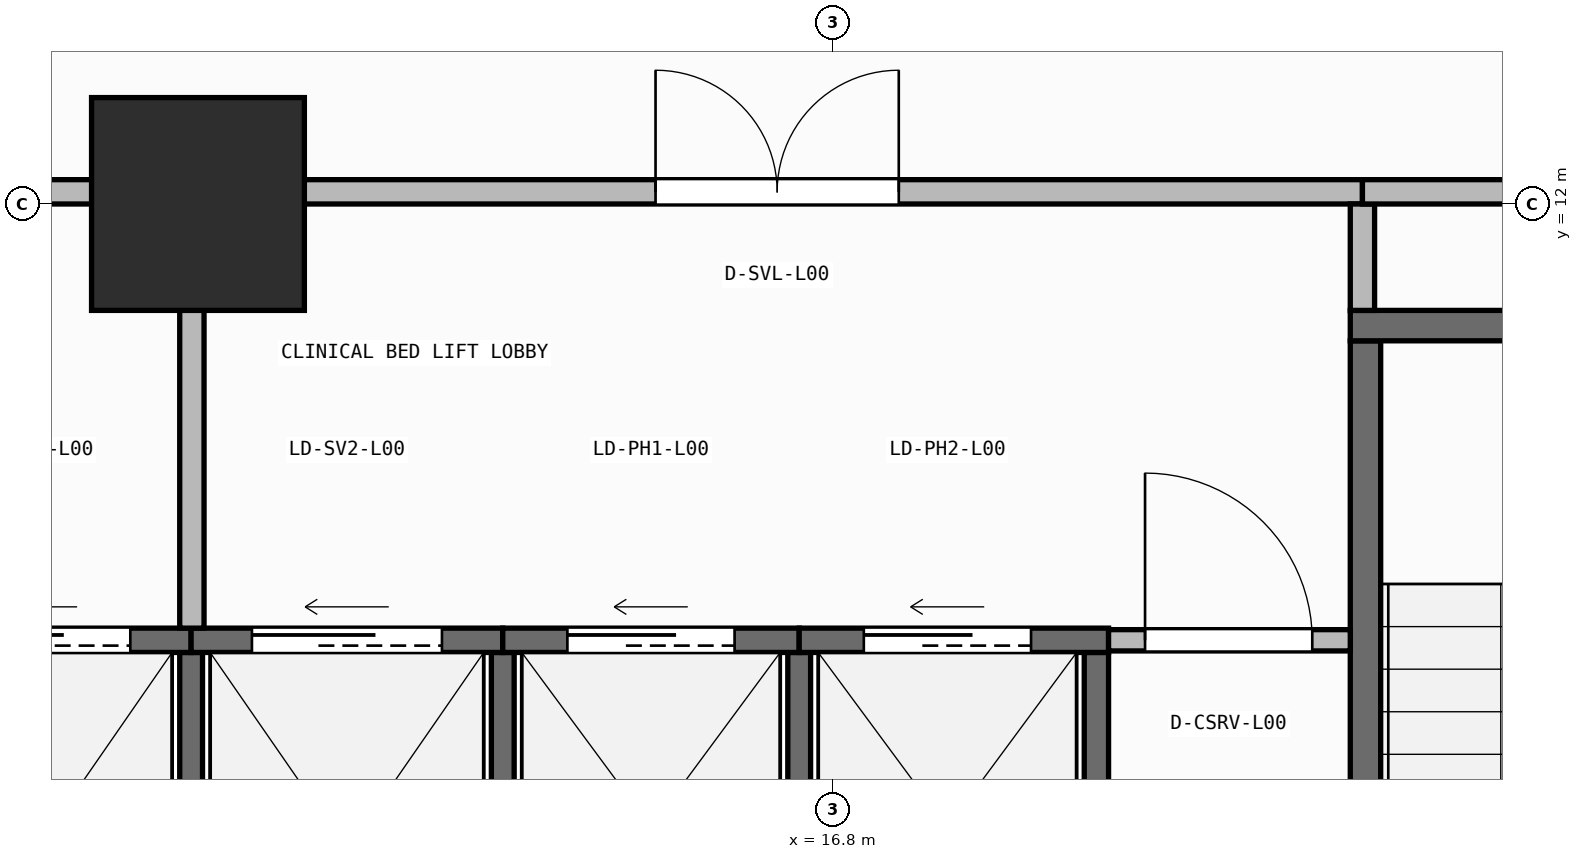
"""IFC4 building model, lengths in metres.
Left out: names, types, materials, properties, quantities, classifications, styles, units other than length and angle.
Written with IfcOpenShell. Run it as: python <this file> out.ifc"""

import sys

from ifc_helpers import new_model, si_unit, direction, frame, frame_2d, origin, origin_2d, place, context, subcontext, project, spatial, rectangle, extrude, element, fill, save


model = new_model("IFC4")
c1 = context("Model", 3, precision=1e-05, world=origin(), true_north=direction((0.0, 1.0)))
c2 = subcontext(c1, "Body", "Model", "MODEL_VIEW")
j1 = project(units=[si_unit("LENGTHUNIT", "METRE"), si_unit("PLANEANGLEUNIT", "RADIAN")], contexts=[c1])
p1 = place(None, origin())
s1 = spatial("IfcSite", under=j1, at=p1, CompositionType="ELEMENT")
p2 = place(p1, origin())
s2 = spatial("IfcBuilding", under=s1, at=p2, CompositionType="ELEMENT")
p3 = place(p2, origin())
s3 = spatial("IfcBuildingStorey", under=s2, at=p3, CompositionType="ELEMENT", Elevation=0.0)
p4 = place(p3, frame((12.62, 12.0, 0.0), z_axis=(0.0, 0.0, 1.0), x_axis=(1.0, 0.0, 0.0)))
e1 = element("IfcColumn", 1, at=p4, inside=s3, PredefinedType="COLUMN", context=c2, shape_type="SweptSolid", body=[
    extrude(rectangle(XDim=1.4, YDim=1.4, at=origin_2d()), origin(), (0.0, 0.0, 1.0), 4.5),
])
p5 = place(p3, frame((20.3, 3.5, 0.0), z_axis=(0.0, 0.0, 1.0), x_axis=(0.0, 1.0, 0.0)))
e2 = element("IfcWall", 2, at=p5, inside=s3, PredefinedType="SHEAR", context=c2, shape_type="SweptSolid", body=[
    extrude(rectangle(XDim=7.6, YDim=0.2, at=frame_2d((3.8, 0.0))), origin(), (0.0, 0.0, 1.0), 4.25),
])
p6 = place(p3, frame((20.2, 11.2, 0.0), z_axis=(0.0, 0.0, 1.0), x_axis=(1.0, 0.0, 0.0)))
e3 = element("IfcWall", 3, at=p6, inside=s3, PredefinedType="SHEAR", context=c2, shape_type="SweptSolid", body=[
    extrude(rectangle(XDim=3.7, YDim=0.2, at=frame_2d((1.85, 0.0))), origin(), (0.0, 0.0, 1.0), 4.25),
])
p7 = place(p6, frame((1.2, 0.0, 0.0)))
e4 = element("IfcOpeningElement", 4, at=p7, cuts=e3, PredefinedType="OPENING", context=c2, shape_type="SweptSolid", body=[
    extrude(rectangle(XDim=1.3, YDim=2.15, at=frame_2d((0.65, 1.075))), frame((0.0, 0.11, 0.0), z_axis=(0.0, -1.0, 0.0), x_axis=(1.0, 0.0, 0.0)), (0.0, 0.0, 1.0), 0.22),
])
p8 = place(p3, frame((18.53, 6.3, 0.0), z_axis=(0.0, 0.0, 1.0), x_axis=(0.0, 1.0, 0.0)))
e5 = element("IfcWall", 5, at=p8, inside=s3, PredefinedType="SHEAR", context=c2, shape_type="SweptSolid", body=[
    extrude(rectangle(XDim=2.75, YDim=0.16, at=frame_2d((1.375, 0.0))), origin(), (0.0, 0.0, 1.0), 4.25),
])
for number, where, z_axis, x_axis in (
    (6, (12.575, 6.3, 0.0), (0.0, 0.0, 1.0), (0.0, 1.0, 0.0)),
    (7, (14.625, 6.3, 0.0), (0.0, 0.0, 1.0), (0.0, 1.0, 0.0)),
    (8, (16.575, 6.3, 0.0), (0.0, 0.0, 1.0), (0.0, 1.0, 0.0)),
):
    element("IfcWall", number, at=place(p3, frame(where, z_axis=z_axis, x_axis=x_axis)), inside=s3, PredefinedType="SHEAR", context=c2, shape_type="SweptSolid", body=[
        extrude(rectangle(XDim=2.75, YDim=0.15, at=frame_2d((1.375, 0.0))), origin(), (0.0, 0.0, 1.0), 4.25),
    ])
p9 = place(p3, frame((10.525, 9.13, 0.0), z_axis=(0.0, 0.0, 1.0), x_axis=(1.0, 0.0, 0.0)))
e9 = element("IfcWall", 9, at=p9, inside=s3, PredefinedType="SHEAR", context=c2, shape_type="SweptSolid", body=[
    extrude(rectangle(XDim=2.05, YDim=0.16, at=frame_2d((1.025, 0.0))), origin(), (0.0, 0.0, 1.0), 4.25),
])
p10 = place(p9, frame((0.4, 0.0, 0.0)))
e10 = element("IfcOpeningElement", 10, at=p10, cuts=e9, PredefinedType="OPENING", context=c2, shape_type="SweptSolid", body=[
    extrude(rectangle(XDim=1.25, YDim=2.15, at=frame_2d((0.625, 1.075))), frame((0.0, 0.09, 0.0), z_axis=(0.0, -1.0, 0.0), x_axis=(1.0, 0.0, 0.0)), (0.0, 0.0, 1.0), 0.18),
])
p11 = place(p3, frame((12.575, 9.13, 0.0), z_axis=(0.0, 0.0, 1.0), x_axis=(1.0, 0.0, 0.0)))
e11 = element("IfcWall", 11, at=p11, inside=s3, PredefinedType="SHEAR", context=c2, shape_type="SweptSolid", body=[
    extrude(rectangle(XDim=2.05, YDim=0.16, at=frame_2d((1.025, 0.0))), origin(), (0.0, 0.0, 1.0), 4.25),
])
p12 = place(p11, frame((0.4, 0.0, 0.0)))
e12 = element("IfcOpeningElement", 12, at=p12, cuts=e11, PredefinedType="OPENING", context=c2, shape_type="SweptSolid", body=[
    extrude(rectangle(XDim=1.25, YDim=2.15, at=frame_2d((0.625, 1.075))), frame((0.0, 0.09, 0.0), z_axis=(0.0, -1.0, 0.0), x_axis=(1.0, 0.0, 0.0)), (0.0, 0.0, 1.0), 0.18),
])
p13 = place(p3, frame((14.625, 9.13, 0.0), z_axis=(0.0, 0.0, 1.0), x_axis=(1.0, 0.0, 0.0)))
e13 = element("IfcWall", 13, at=p13, inside=s3, PredefinedType="SHEAR", context=c2, shape_type="SweptSolid", body=[
    extrude(rectangle(XDim=1.95, YDim=0.16, at=frame_2d((0.975, 0.0))), origin(), (0.0, 0.0, 1.0), 4.25),
])
p14 = place(p13, frame((0.425, 0.0, 0.0)))
e14 = element("IfcOpeningElement", 14, at=p14, cuts=e13, PredefinedType="OPENING", context=c2, shape_type="SweptSolid", body=[
    extrude(rectangle(XDim=1.1, YDim=2.15, at=frame_2d((0.55, 1.075))), frame((0.0, 0.09, 0.0), z_axis=(0.0, -1.0, 0.0), x_axis=(1.0, 0.0, 0.0)), (0.0, 0.0, 1.0), 0.18),
])
p15 = place(p3, frame((16.575, 9.13, 0.0), z_axis=(0.0, 0.0, 1.0), x_axis=(1.0, 0.0, 0.0)))
e15 = element("IfcWall", 15, at=p15, inside=s3, PredefinedType="SHEAR", context=c2, shape_type="SweptSolid", body=[
    extrude(rectangle(XDim=2.035, YDim=0.16, at=frame_2d((1.018, 0.0))), origin(), (0.0, 0.0, 1.0), 4.25),
])
p16 = place(p15, frame((0.425, 0.0, 0.0)))
e16 = element("IfcOpeningElement", 16, at=p16, cuts=e15, PredefinedType="OPENING", context=c2, shape_type="SweptSolid", body=[
    extrude(rectangle(XDim=1.1, YDim=2.15, at=frame_2d((0.55, 1.075))), frame((0.0, 0.09, 0.0), z_axis=(0.0, -1.0, 0.0), x_axis=(1.0, 0.0, 0.0)), (0.0, 0.0, 1.0), 0.18),
])
p17 = place(p3, frame((18.61, 9.13, 0.0), z_axis=(0.0, 0.0, 1.0), x_axis=(1.0, 0.0, 0.0)))
e17 = element("IfcWall", 17, at=p17, inside=s3, PredefinedType="PARTITIONING", context=c2, shape_type="SweptSolid", body=[
    extrude(rectangle(XDim=1.59, YDim=0.14, at=frame_2d((0.795, 0.0))), origin(), (0.0, 0.0, 1.0), 4.25),
])
p18 = place(p17, frame((0.24, 0.0, 0.0)))
e18 = element("IfcOpeningElement", 18, at=p18, cuts=e17, PredefinedType="OPENING", context=c2, shape_type="SweptSolid", body=[
    extrude(rectangle(XDim=1.1, YDim=2.1, at=frame_2d((0.55, 1.05))), frame((0.0, 0.08, 0.0), z_axis=(0.0, -1.0, 0.0), x_axis=(1.0, 0.0, 0.0)), (0.0, 0.0, 1.0), 0.16),
])
p19 = place(p3, frame((6.4, 12.08, 0.0), z_axis=(0.0, 0.0, 1.0), x_axis=(1.0, 0.0, 0.0)))
e19 = element("IfcWall", 19, at=p19, inside=s3, PredefinedType="PARTITIONING", context=c2, shape_type="SweptSolid", body=[
    extrude(rectangle(XDim=6.18, YDim=0.16, at=frame_2d((3.09, 0.0))), origin(), (0.0, 0.0, 1.0), 3.425),
])
p20 = place(p19, frame((2.29, 0.0, 0.0)))
e20 = element("IfcOpeningElement", 20, at=p20, cuts=e19, PredefinedType="OPENING", context=c2, shape_type="SweptSolid", body=[
    extrude(rectangle(XDim=1.6, YDim=2.05, at=frame_2d((0.8, 1.025))), frame((0.0, 0.09, 0.0), z_axis=(0.0, -1.0, 0.0), x_axis=(1.0, 0.0, 0.0)), (0.0, 0.0, 1.0), 0.18),
])
p21 = place(p3, frame((12.58, 9.21, 0.0), z_axis=(0.0, 0.0, 1.0), x_axis=(0.0, 1.0, 0.0)))
e21 = element("IfcWall", 21, at=p21, inside=s3, PredefinedType="PARTITIONING", context=c2, shape_type="SweptSolid", body=[
    extrude(rectangle(XDim=2.79, YDim=0.16, at=frame_2d((1.395, 0.0))), origin(), (0.0, 0.0, 1.0), 4.25),
])
p22 = place(p3, frame((12.58, 12.08, 0.0), z_axis=(0.0, 0.0, 1.0), x_axis=(1.0, 0.0, 0.0)))
e22 = element("IfcWall", 22, at=p22, inside=s3, PredefinedType="PARTITIONING", context=c2, shape_type="SweptSolid", body=[
    extrude(rectangle(XDim=7.7, YDim=0.16, at=frame_2d((3.85, 0.0))), origin(), (0.0, 0.0, 1.0), 3.425),
])
p23 = place(p22, frame((3.05, 0.0, 0.0)))
e23 = element("IfcOpeningElement", 23, at=p23, cuts=e22, PredefinedType="OPENING", context=c2, shape_type="SweptSolid", body=[
    extrude(rectangle(XDim=1.6, YDim=2.05, at=frame_2d((0.8, 1.025))), frame((0.0, 0.09, 0.0), z_axis=(0.0, -1.0, 0.0), x_axis=(1.0, 0.0, 0.0)), (0.0, 0.0, 1.0), 0.18),
])
p24 = place(p3, frame((20.28, 11.3, 0.0), z_axis=(0.0, 0.0, 1.0), x_axis=(0.0, 1.0, 0.0)))
e24 = element("IfcWall", 24, at=p24, inside=s3, PredefinedType="PARTITIONING", context=c2, shape_type="SweptSolid", body=[
    extrude(rectangle(XDim=0.7, YDim=0.16, at=frame_2d((0.35, 0.0))), origin(), (0.0, 0.0, 1.0), 4.25),
])
p25 = place(p3, frame((20.28, 12.08, 0.0), z_axis=(0.0, 0.0, 1.0), x_axis=(1.0, 0.0, 0.0)))
e25 = element("IfcWall", 25, at=p25, inside=s3, PredefinedType="PARTITIONING", context=c2, shape_type="SweptSolid", body=[
    extrude(rectangle(XDim=3.62, YDim=0.16, at=frame_2d((1.81, 0.0))), origin(), (0.0, 0.0, 1.0), 3.425),
])
p26 = place(p25, frame((1.01, 0.0, 0.0)))
e26 = element("IfcOpeningElement", 26, at=p26, cuts=e25, PredefinedType="OPENING", context=c2, shape_type="SweptSolid", body=[
    extrude(rectangle(XDim=1.6, YDim=2.05, at=frame_2d((0.8, 1.025))), frame((0.0, 0.09, 0.0), z_axis=(0.0, -1.0, 0.0), x_axis=(1.0, 0.0, 0.0)), (0.0, 0.0, 1.0), 0.18),
])
p27 = place(p10, origin())
e27 = element("IfcDoor", 27, at=p27, inside=s3, OperationType="SLIDING_TO_LEFT", PredefinedType="DOOR", context=c2, shape_type="SweptSolid", body=[
    extrude(rectangle(XDim=1.25, YDim=2.15, at=frame_2d((0.625, 1.075))), frame((0.0, 0.025, 0.0), z_axis=(0.0, -1.0, 0.0), x_axis=(1.0, 0.0, 0.0)), (0.0, 0.0, 1.0), 0.05),
])
fill(e10, e27)
p28 = place(p12, origin())
e28 = element("IfcDoor", 28, at=p28, inside=s3, OperationType="SLIDING_TO_LEFT", PredefinedType="DOOR", context=c2, shape_type="SweptSolid", body=[
    extrude(rectangle(XDim=1.25, YDim=2.15, at=frame_2d((0.625, 1.075))), frame((0.0, 0.025, 0.0), z_axis=(0.0, -1.0, 0.0), x_axis=(1.0, 0.0, 0.0)), (0.0, 0.0, 1.0), 0.05),
])
fill(e12, e28)
p29 = place(p14, origin())
e29 = element("IfcDoor", 29, at=p29, inside=s3, OperationType="SLIDING_TO_LEFT", PredefinedType="DOOR", context=c2, shape_type="SweptSolid", body=[
    extrude(rectangle(XDim=1.1, YDim=2.15, at=frame_2d((0.55, 1.075))), frame((0.0, 0.025, 0.0), z_axis=(0.0, -1.0, 0.0), x_axis=(1.0, 0.0, 0.0)), (0.0, 0.0, 1.0), 0.05),
])
fill(e14, e29)
p30 = place(p16, origin())
e30 = element("IfcDoor", 30, at=p30, inside=s3, OperationType="SLIDING_TO_LEFT", PredefinedType="DOOR", context=c2, shape_type="SweptSolid", body=[
    extrude(rectangle(XDim=1.1, YDim=2.15, at=frame_2d((0.55, 1.075))), frame((0.0, 0.025, 0.0), z_axis=(0.0, -1.0, 0.0), x_axis=(1.0, 0.0, 0.0)), (0.0, 0.0, 1.0), 0.05),
])
fill(e16, e30)
p31 = place(p18, origin())
e31 = element("IfcDoor", 31, at=p31, inside=s3, OperationType="SINGLE_SWING_LEFT", PredefinedType="DOOR", context=c2, shape_type="SweptSolid", body=[
    extrude(rectangle(XDim=1.1, YDim=2.1, at=frame_2d((0.55, 1.05))), frame((0.0, 0.025, 0.0), z_axis=(0.0, -1.0, 0.0), x_axis=(1.0, 0.0, 0.0)), (0.0, 0.0, 1.0), 0.05),
])
fill(e18, e31)
p32 = place(p23, origin())
e32 = element("IfcDoor", 32, at=p32, inside=s3, OperationType="DOUBLE_DOOR_SINGLE_SWING", PredefinedType="DOOR", context=c2, shape_type="SweptSolid", body=[
    extrude(rectangle(XDim=1.6, YDim=2.05, at=frame_2d((0.8, 1.025))), frame((0.0, 0.025, 0.0), z_axis=(0.0, -1.0, 0.0), x_axis=(1.0, 0.0, 0.0)), (0.0, 0.0, 1.0), 0.05),
])
fill(e23, e32)
save(model, sys.argv[1])
